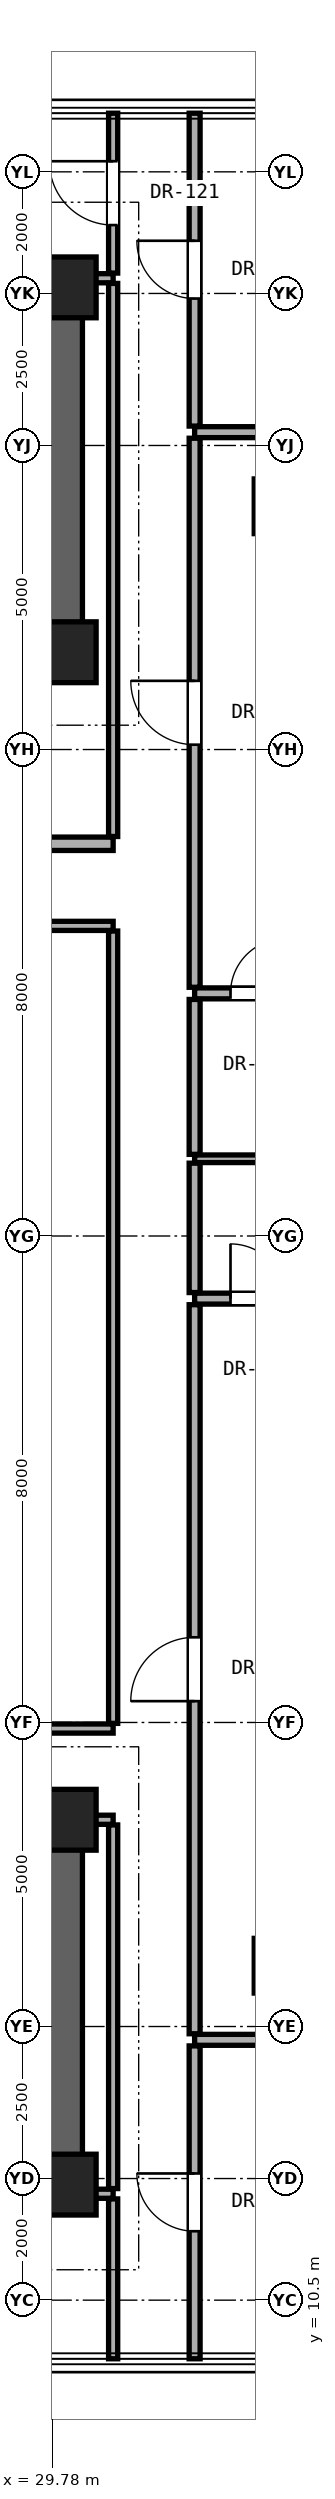
"""IFC4 building model, lengths in metres.
Left out: names, types, materials, properties, quantities, classifications, styles, units other than length and angle.
Written with IfcOpenShell. Run it as: python <this file> out.ifc"""

import sys

from ifc_helpers import new_model, si_unit, direction, frame, frame_2d, origin, origin_2d, place, context, subcontext, project, spatial, rectangle, extrude, element, fill, save


model = new_model("IFC4")
c1 = context("Model", 3, precision=1e-05, world=origin(), true_north=direction((0.0, 1.0)))
c2 = subcontext(c1, "Body", "Model", "MODEL_VIEW")
j1 = project(units=[si_unit("LENGTHUNIT", "METRE"), si_unit("PLANEANGLEUNIT", "RADIAN")], contexts=[c1])
p1 = place(None, origin())
s1 = spatial("IfcSite", under=j1, at=p1, CompositionType="ELEMENT")
p2 = place(p1, origin())
s2 = spatial("IfcBuilding", under=s1, at=p2, CompositionType="ELEMENT")
p3 = place(p2, frame((0.0, 0.0, 164.15)))
s3 = spatial("IfcBuildingStorey", under=s2, at=p3, CompositionType="ELEMENT", Elevation=164.15)
for number, where, z_axis, x_axis in (
    (1, (30.0, 12.4, 0.0), (0.0, 0.0, 1.0), (1.0, 0.0, 0.0)),
    (2, (30.0, 18.4, 0.0), (0.0, 0.0, 1.0), (1.0, 0.0, 0.0)),
    (3, (30.0, 37.6, 0.0), (0.0, 0.0, 1.0), (1.0, 0.0, 0.0)),
    (4, (30.0, 43.6, 0.0), (0.0, 0.0, 1.0), (1.0, 0.0, 0.0)),
):
    element("IfcColumn", number, at=place(p3, frame(where, z_axis=z_axis, x_axis=x_axis)), inside=s3, PredefinedType="COLUMN", context=c2, shape_type="SweptSolid", body=[
        extrude(rectangle(XDim=1.0, YDim=1.0, at=origin_2d()), origin(), (0.0, 0.0, 1.0), 3.25),
    ])
for number, where, z_axis, x_axis in (
    (5, (33.4, 16.0, 0.0), (0.0, 0.0, 1.0), (1.0, 0.0, 0.0)),
    (6, (33.4, 40.0, 0.0), (0.0, 0.0, 1.0), (1.0, 0.0, 0.0)),
):
    element("IfcColumn", number, at=place(p3, frame(where, z_axis=z_axis, x_axis=x_axis)), inside=s3, PredefinedType="PILASTER", context=c2, shape_type="SweptSolid", body=[
        extrude(rectangle(XDim=0.6, YDim=0.9, at=origin_2d()), origin(), (0.0, 0.0, 1.0), 3.25),
    ])
p4 = place(p3, frame((11.0, 43.6, 0.0), z_axis=(0.0, 0.0, 1.0), x_axis=(1.0, 0.0, 0.0)))
e7 = element("IfcWall", 7, at=p4, inside=s3, PredefinedType="SHEAR", context=c2, shape_type="SweptSolid", body=[
    extrude(rectangle(XDim=19.0, YDim=0.55, at=frame_2d((9.5, 0.0))), origin(), (0.0, 0.0, 1.0), 3.05),
])
p5 = place(p3, frame((30.0, 37.6, 0.0), z_axis=(0.0, 0.0, 1.0), x_axis=(0.0, 1.0, 0.0)))
e8 = element("IfcWall", 8, at=p5, inside=s3, PredefinedType="SHEAR", context=c2, shape_type="SweptSolid", body=[
    extrude(rectangle(XDim=6.0, YDim=0.55, at=frame_2d((3.0, 0.0))), origin(), (0.0, 0.0, 1.0), 3.05),
])
p6 = place(p3, frame((11.0, 37.6, 0.0), z_axis=(0.0, 0.0, 1.0), x_axis=(1.0, 0.0, 0.0)))
e9 = element("IfcWall", 9, at=p6, inside=s3, PredefinedType="SHEAR", context=c2, shape_type="SweptSolid", body=[
    extrude(rectangle(XDim=19.0, YDim=0.55, at=frame_2d((9.5, 0.0))), origin(), (0.0, 0.0, 1.0), 3.05),
])
p7 = place(p6, frame((1.06, 0.0, 0.0)))
e10 = element("IfcOpeningElement", 10, at=p7, cuts=e9, PredefinedType="OPENING", context=c2, shape_type="SweptSolid", body=[
    extrude(rectangle(XDim=1.15, YDim=2.2, at=frame_2d((0.575, 1.1))), frame((0.0, 0.285, 0.0), z_axis=(0.0, -1.0, 0.0), x_axis=(1.0, 0.0, 0.0)), (0.0, 0.0, 1.0), 0.57),
])
p8 = place(p6, frame((9.55, 0.0, 0.0)))
e11 = element("IfcOpeningElement", 11, at=p8, cuts=e9, PredefinedType="OPENING", context=c2, shape_type="SweptSolid", body=[
    extrude(rectangle(XDim=1.4, YDim=2.35, at=frame_2d((0.7, 1.175))), frame((0.0, 0.285, 0.0), z_axis=(0.0, -1.0, 0.0), x_axis=(1.0, 0.0, 0.0)), (0.0, 0.0, 1.0), 0.57),
])
p9 = place(p6, frame((11.95, 0.0, 0.0)))
e12 = element("IfcOpeningElement", 12, at=p9, cuts=e9, PredefinedType="OPENING", context=c2, shape_type="SweptSolid", body=[
    extrude(rectangle(XDim=1.4, YDim=2.35, at=frame_2d((0.7, 1.175))), frame((0.0, 0.285, 0.0), z_axis=(0.0, -1.0, 0.0), x_axis=(1.0, 0.0, 0.0)), (0.0, 0.0, 1.0), 0.57),
])
p10 = place(p3, frame((11.0, 12.4, 0.0), z_axis=(0.0, 0.0, 1.0), x_axis=(1.0, 0.0, 0.0)))
e13 = element("IfcWall", 13, at=p10, inside=s3, PredefinedType="SHEAR", context=c2, shape_type="SweptSolid", body=[
    extrude(rectangle(XDim=19.0, YDim=0.55, at=frame_2d((9.5, 0.0))), origin(), (0.0, 0.0, 1.0), 3.05),
])
p11 = place(p3, frame((30.0, 12.4, 0.0), z_axis=(0.0, 0.0, 1.0), x_axis=(0.0, 1.0, 0.0)))
e14 = element("IfcWall", 14, at=p11, inside=s3, PredefinedType="SHEAR", context=c2, shape_type="SweptSolid", body=[
    extrude(rectangle(XDim=6.0, YDim=0.55, at=frame_2d((3.0, 0.0))), origin(), (0.0, 0.0, 1.0), 3.05),
])
p12 = place(p3, frame((11.0, 18.4, 0.0), z_axis=(0.0, 0.0, 1.0), x_axis=(1.0, 0.0, 0.0)))
e15 = element("IfcWall", 15, at=p12, inside=s3, PredefinedType="SHEAR", context=c2, shape_type="SweptSolid", body=[
    extrude(rectangle(XDim=19.0, YDim=0.55, at=frame_2d((9.5, 0.0))), origin(), (0.0, 0.0, 1.0), 3.05),
])
p13 = place(p12, frame((4.175, 0.0, 0.0)))
e16 = element("IfcOpeningElement", 16, at=p13, cuts=e15, PredefinedType="OPENING", context=c2, shape_type="SweptSolid", body=[
    extrude(rectangle(XDim=1.2, YDim=2.25, at=frame_2d((0.6, 1.125))), frame((0.0, 0.285, 0.0), z_axis=(0.0, -1.0, 0.0), x_axis=(1.0, 0.0, 0.0)), (0.0, 0.0, 1.0), 0.57),
])
p14 = place(p12, frame((14.3, 0.0, 0.0)))
e17 = element("IfcOpeningElement", 17, at=p14, cuts=e15, PredefinedType="OPENING", context=c2, shape_type="SweptSolid", body=[
    extrude(rectangle(XDim=1.3, YDim=2.3, at=frame_2d((0.65, 1.15))), frame((0.0, 0.285, 0.0), z_axis=(0.0, -1.0, 0.0), x_axis=(1.0, 0.0, 0.0)), (0.0, 0.0, 1.0), 0.57),
])
p15 = place(p12, frame((16.6, 0.0, 0.0)))
e18 = element("IfcOpeningElement", 18, at=p15, cuts=e15, PredefinedType="OPENING", context=c2, shape_type="SweptSolid", body=[
    extrude(rectangle(XDim=1.3, YDim=2.3, at=frame_2d((0.65, 1.15))), frame((0.0, 0.285, 0.0), z_axis=(0.0, -1.0, 0.0), x_axis=(1.0, 0.0, 0.0)), (0.0, 0.0, 1.0), 0.57),
])
p16 = place(p3, frame((30.27, 12.25, 0.0), z_axis=(0.0, 0.0, 1.0), x_axis=(1.0, 0.0, 0.0)))
e19 = element("IfcWall", 19, at=p16, inside=s3, PredefinedType="PARTITIONING", context=c2, shape_type="SweptSolid", body=[
    extrude(rectangle(XDim=0.51, YDim=0.15, at=frame_2d((0.255, 0.0))), origin(), (0.0, 0.0, 1.0), 3.05),
])
p17 = place(p3, frame((32.12, 14.781, 0.0), z_axis=(0.0, 0.0, 1.0), x_axis=(1.0, 0.0, 0.0)))
e20 = element("IfcWall", 20, at=p17, inside=s3, PredefinedType="PARTITIONING", context=c2, shape_type="SweptSolid", body=[
    extrude(rectangle(XDim=3.585, YDim=0.18, at=frame_2d((1.792, 0.0))), origin(), (0.0, 0.0, 1.0), 3.05),
])
p18 = place(p3, frame((30.27, 18.4, 0.0), z_axis=(0.0, 0.0, 1.0), x_axis=(1.0, 0.0, 0.0)))
e21 = element("IfcWall", 21, at=p18, inside=s3, PredefinedType="PARTITIONING", context=c2, shape_type="SweptSolid", body=[
    extrude(rectangle(XDim=0.51, YDim=0.15, at=frame_2d((0.255, 0.0))), origin(), (0.0, 0.0, 1.0), 2.442),
])
p19 = place(p3, frame((10.22, 19.9, 0.0), z_axis=(0.0, 0.0, 1.0), x_axis=(1.0, 0.0, 0.0)))
e22 = element("IfcWall", 22, at=p19, inside=s3, PredefinedType="PARTITIONING", context=c2, shape_type="SweptSolid", body=[
    extrude(rectangle(XDim=20.56, YDim=0.15, at=frame_2d((10.28, 0.0))), origin(), (0.0, 0.0, 1.0), 2.186),
])
p20 = place(p19, frame((1.66, 0.0, 0.0)))
e23 = element("IfcOpeningElement", 23, at=p20, cuts=e22, PredefinedType="OPENING", context=c2, shape_type="SweptSolid", body=[
    extrude(rectangle(XDim=0.9, YDim=2.1, at=frame_2d((0.45, 1.05))), frame((0.0, 0.085, 0.0), z_axis=(0.0, -1.0, 0.0), x_axis=(1.0, 0.0, 0.0)), (0.0, 0.0, 1.0), 0.17),
])
p21 = place(p19, frame((3.87, 0.0, 0.0)))
e24 = element("IfcOpeningElement", 24, at=p21, cuts=e22, PredefinedType="OPENING", context=c2, shape_type="SweptSolid", body=[
    extrude(rectangle(XDim=0.95, YDim=2.15, at=frame_2d((0.475, 1.075))), frame((0.0, 0.085, 0.0), z_axis=(0.0, -1.0, 0.0), x_axis=(1.0, 0.0, 0.0)), (0.0, 0.0, 1.0), 0.17),
])
p22 = place(p19, frame((7.661, 0.0, 0.0)))
e25 = element("IfcOpeningElement", 25, at=p22, cuts=e22, PredefinedType="OPENING", context=c2, shape_type="SweptSolid", body=[
    extrude(rectangle(XDim=0.85, YDim=2.01, at=frame_2d((0.425, 1.005))), frame((0.0, 0.085, 0.0), z_axis=(0.0, -1.0, 0.0), x_axis=(1.0, 0.0, 0.0)), (0.0, 0.0, 1.0), 0.17),
])
p23 = place(p3, frame((32.12, 26.97, 0.0), z_axis=(0.0, 0.0, 1.0), x_axis=(1.0, 0.0, 0.0)))
e26 = element("IfcWall", 26, at=p23, inside=s3, PredefinedType="PARTITIONING", context=c2, shape_type="SweptSolid", body=[
    extrude(rectangle(XDim=8.85, YDim=0.18, at=frame_2d((4.425, 0.0))), origin(), (0.0, 0.0, 1.0), 2.269),
])
p24 = place(p23, frame((4.95, 0.0, 0.0)))
e27 = element("IfcOpeningElement", 27, at=p24, cuts=e26, PredefinedType="OPENING", context=c2, shape_type="SweptSolid", body=[
    extrude(rectangle(XDim=0.95, YDim=2.15, at=frame_2d((0.475, 1.075))), frame((0.0, 0.1, 0.0), z_axis=(0.0, -1.0, 0.0), x_axis=(1.0, 0.0, 0.0)), (0.0, 0.0, 1.0), 0.2),
])
p25 = place(p23, frame((0.59, 0.0, 0.0)))
e28 = element("IfcOpeningElement", 28, at=p25, cuts=e26, PredefinedType="OPENING", context=c2, shape_type="SweptSolid", body=[
    extrude(rectangle(XDim=0.9, YDim=2.1, at=frame_2d((0.45, 1.05))), frame((0.0, 0.1, 0.0), z_axis=(0.0, -1.0, 0.0), x_axis=(1.0, 0.0, 0.0)), (0.0, 0.0, 1.0), 0.2),
])
p26 = place(p3, frame((32.12, 29.27, 0.0), z_axis=(0.0, 0.0, 1.0), x_axis=(1.0, 0.0, 0.0)))
e29 = element("IfcWall", 29, at=p26, inside=s3, PredefinedType="PARTITIONING", context=c2, shape_type="SweptSolid", body=[
    extrude(rectangle(XDim=8.85, YDim=0.125, at=frame_2d((4.425, 0.0))), origin(), (0.0, 0.0, 1.0), 2.269),
])
p27 = place(p3, frame((32.12, 31.99, 0.0), z_axis=(0.0, 0.0, 1.0), x_axis=(1.0, 0.0, 0.0)))
e30 = element("IfcWall", 30, at=p27, inside=s3, PredefinedType="PARTITIONING", context=c2, shape_type="SweptSolid", body=[
    extrude(rectangle(XDim=8.85, YDim=0.18, at=frame_2d((4.425, 0.0))), origin(), (0.0, 0.0, 1.0), 2.269),
])
p28 = place(p27, frame((4.95, 0.0, 0.0)))
e31 = element("IfcOpeningElement", 31, at=p28, cuts=e30, PredefinedType="OPENING", context=c2, shape_type="SweptSolid", body=[
    extrude(rectangle(XDim=0.95, YDim=2.15, at=frame_2d((0.475, 1.075))), frame((0.0, 0.1, 0.0), z_axis=(0.0, -1.0, 0.0), x_axis=(1.0, 0.0, 0.0)), (0.0, 0.0, 1.0), 0.2),
])
p29 = place(p27, frame((0.59, 0.0, 0.0)))
e32 = element("IfcOpeningElement", 32, at=p29, cuts=e30, PredefinedType="OPENING", context=c2, shape_type="SweptSolid", body=[
    extrude(rectangle(XDim=0.9, YDim=2.1, at=frame_2d((0.45, 1.05))), frame((0.0, 0.1, 0.0), z_axis=(0.0, -1.0, 0.0), x_axis=(1.0, 0.0, 0.0)), (0.0, 0.0, 1.0), 0.2),
])
p30 = place(p3, frame((10.22, 33.1, 0.0), z_axis=(0.0, 0.0, 1.0), x_axis=(1.0, 0.0, 0.0)))
e33 = element("IfcWall", 33, at=p30, inside=s3, PredefinedType="PARTITIONING", context=c2, shape_type="SweptSolid", body=[
    extrude(rectangle(XDim=20.56, YDim=0.15, at=frame_2d((10.28, 0.0))), origin(), (0.0, 0.0, 1.0), 2.186),
])
p31 = place(p30, frame((12.636, 0.0, 0.0)))
e34 = element("IfcOpeningElement", 34, at=p31, cuts=e33, PredefinedType="OPENING", context=c2, shape_type="SweptSolid", body=[
    extrude(rectangle(XDim=0.85, YDim=2.01, at=frame_2d((0.425, 1.005))), frame((0.0, 0.085, 0.0), z_axis=(0.0, -1.0, 0.0), x_axis=(1.0, 0.0, 0.0)), (0.0, 0.0, 1.0), 0.17),
])
p32 = place(p30, frame((17.665, 0.0, 0.0)))
e35 = element("IfcOpeningElement", 35, at=p32, cuts=e33, PredefinedType="OPENING", context=c2, shape_type="SweptSolid", body=[
    extrude(rectangle(XDim=0.85, YDim=2.01, at=frame_2d((0.425, 1.005))), frame((0.0, 0.085, 0.0), z_axis=(0.0, -1.0, 0.0), x_axis=(1.0, 0.0, 0.0)), (0.0, 0.0, 1.0), 0.17),
])
p33 = place(p3, frame((15.59, 34.45, 0.0), z_axis=(0.0, 0.0, 1.0), x_axis=(1.0, 0.0, 0.0)))
e36 = element("IfcWall", 36, at=p33, inside=s3, PredefinedType="SOLIDWALL", context=c2, shape_type="SweptSolid", body=[
    extrude(rectangle(XDim=15.19, YDim=0.22, at=frame_2d((7.595, 0.0))), origin(), (0.0, 0.0, 1.0), 2.186),
])
p34 = place(p33, frame((6.435, 0.0, 0.0)))
e37 = element("IfcOpeningElement", 37, at=p34, cuts=e36, PredefinedType="OPENING", context=c2, shape_type="SweptSolid", body=[
    extrude(rectangle(XDim=0.85, YDim=2.01, at=frame_2d((0.425, 1.005))), frame((0.0, 0.12, 0.0), z_axis=(0.0, -1.0, 0.0), x_axis=(1.0, 0.0, 0.0)), (0.0, 0.0, 1.0), 0.24),
])
p35 = place(p33, frame((9.96, 0.0, 0.0)))
e38 = element("IfcOpeningElement", 38, at=p35, cuts=e36, PredefinedType="OPENING", context=c2, shape_type="SweptSolid", body=[
    extrude(rectangle(XDim=0.95, YDim=2.15, at=frame_2d((0.475, 1.075))), frame((0.0, 0.12, 0.0), z_axis=(0.0, -1.0, 0.0), x_axis=(1.0, 0.0, 0.0)), (0.0, 0.0, 1.0), 0.24),
])
p36 = place(p33, frame((12.21, 0.0, 0.0)))
e39 = element("IfcOpeningElement", 39, at=p36, cuts=e36, PredefinedType="OPENING", context=c2, shape_type="SweptSolid", body=[
    extrude(rectangle(XDim=0.95, YDim=2.15, at=frame_2d((0.475, 1.075))), frame((0.0, 0.12, 0.0), z_axis=(0.0, -1.0, 0.0), x_axis=(1.0, 0.0, 0.0)), (0.0, 0.0, 1.0), 0.24),
])
p37 = place(p33, frame((0.675, 0.0, 0.0)))
e40 = element("IfcOpeningElement", 40, at=p37, cuts=e36, PredefinedType="OPENING", context=c2, shape_type="SweptSolid", body=[
    extrude(rectangle(XDim=0.85, YDim=2.01, at=frame_2d((0.425, 1.005))), frame((0.0, 0.12, 0.0), z_axis=(0.0, -1.0, 0.0), x_axis=(1.0, 0.0, 0.0)), (0.0, 0.0, 1.0), 0.24),
])
p38 = place(p33, frame((2.835, 0.0, 0.0)))
e41 = element("IfcOpeningElement", 41, at=p38, cuts=e36, PredefinedType="OPENING", context=c2, shape_type="SweptSolid", body=[
    extrude(rectangle(XDim=0.85, YDim=2.01, at=frame_2d((0.425, 1.005))), frame((0.0, 0.12, 0.0), z_axis=(0.0, -1.0, 0.0), x_axis=(1.0, 0.0, 0.0)), (0.0, 0.0, 1.0), 0.24),
])
p39 = place(p3, frame((32.12, 41.219, 0.0), z_axis=(0.0, 0.0, 1.0), x_axis=(1.0, 0.0, 0.0)))
e42 = element("IfcWall", 42, at=p39, inside=s3, PredefinedType="PARTITIONING", context=c2, shape_type="SweptSolid", body=[
    extrude(rectangle(XDim=3.585, YDim=0.18, at=frame_2d((1.792, 0.0))), origin(), (0.0, 0.0, 1.0), 3.05),
])
p40 = place(p3, frame((30.27, 43.75, 0.0), z_axis=(0.0, 0.0, 1.0), x_axis=(1.0, 0.0, 0.0)))
e43 = element("IfcWall", 43, at=p40, inside=s3, PredefinedType="PARTITIONING", context=c2, shape_type="SweptSolid", body=[
    extrude(rectangle(XDim=0.51, YDim=0.15, at=frame_2d((0.255, 0.0))), origin(), (0.0, 0.0, 1.0), 3.05),
])
p41 = place(p3, frame((30.78, 9.536, 0.0), z_axis=(0.0, 0.0, 1.0), x_axis=(0.0, 1.0, 0.0)))
e44 = element("IfcWall", 44, at=p41, inside=s3, PredefinedType="PARTITIONING", context=c2, shape_type="SweptSolid", body=[
    extrude(rectangle(XDim=2.629, YDim=0.15, at=frame_2d((1.314, 0.0))), origin(), (0.0, 0.0, 1.0), 3.05),
])
p42 = place(p3, frame((30.78, 12.335, 0.0), z_axis=(0.0, 0.0, 1.0), x_axis=(0.0, 1.0, 0.0)))
e45 = element("IfcWall", 45, at=p42, inside=s3, PredefinedType="PARTITIONING", context=c2, shape_type="SweptSolid", body=[
    extrude(rectangle(XDim=5.98, YDim=0.15, at=frame_2d((2.99, 0.0))), origin(), (0.0, 0.0, 1.0), 2.442),
])
p43 = place(p3, frame((30.78, 19.985, 0.0), z_axis=(0.0, 0.0, 1.0), x_axis=(0.0, 1.0, 0.0)))
e46 = element("IfcWall", 46, at=p43, inside=s3, PredefinedType="PARTITIONING", context=c2, shape_type="SweptSolid", body=[
    extrude(rectangle(XDim=13.03, YDim=0.15, at=frame_2d((6.515, 0.0))), origin(), (0.0, 0.0, 1.0), 2.346),
])
p44 = place(p3, frame((30.78, 34.57, 0.0), z_axis=(0.0, 0.0, 1.0), x_axis=(0.0, 1.0, 0.0)))
e47 = element("IfcWall", 47, at=p44, inside=s3, PredefinedType="PARTITIONING", context=c2, shape_type="SweptSolid", body=[
    extrude(rectangle(XDim=9.095, YDim=0.15, at=frame_2d((4.547, 0.0))), origin(), (0.0, 0.0, 1.0), 2.442),
])
p45 = place(p3, frame((30.78, 43.835, 0.0), z_axis=(0.0, 0.0, 1.0), x_axis=(0.0, 1.0, 0.0)))
e48 = element("IfcWall", 48, at=p45, inside=s3, PredefinedType="PARTITIONING", context=c2, shape_type="SweptSolid", body=[
    extrude(rectangle(XDim=2.629, YDim=0.15, at=frame_2d((1.314, 0.0))), origin(), (0.0, 0.0, 1.0), 3.05),
])
p46 = place(p45, frame((0.79, 0.0, 0.0)))
e49 = element("IfcOpeningElement", 49, at=p46, cuts=e48, PredefinedType="OPENING", context=c2, shape_type="SweptSolid", body=[
    extrude(rectangle(XDim=1.05, YDim=2.2, at=frame_2d((0.525, 1.1))), frame((0.0, 0.085, 0.0), z_axis=(0.0, -1.0, 0.0), x_axis=(1.0, 0.0, 0.0)), (0.0, 0.0, 1.0), 0.17),
])
p47 = place(p3, frame((32.12, 9.536, 0.0), z_axis=(0.0, 0.0, 1.0), x_axis=(0.0, 1.0, 0.0)))
e50 = element("IfcWall", 50, at=p47, inside=s3, PredefinedType="PARTITIONING", context=c2, shape_type="SweptSolid", body=[
    extrude(rectangle(XDim=5.145, YDim=0.18, at=frame_2d((2.573, 0.0))), origin(), (0.0, 0.0, 1.0), 3.05),
])
p48 = place(p47, frame((2.097, 0.0, 0.0)))
e51 = element("IfcOpeningElement", 51, at=p48, cuts=e50, PredefinedType="OPENING", context=c2, shape_type="SweptSolid", body=[
    extrude(rectangle(XDim=0.95, YDim=2.15, at=frame_2d((0.475, 1.075))), frame((0.0, 0.1, 0.0), z_axis=(0.0, -1.0, 0.0), x_axis=(1.0, 0.0, 0.0)), (0.0, 0.0, 1.0), 0.2),
])
p49 = place(p3, frame((32.12, 14.881, 0.0), z_axis=(0.0, 0.0, 1.0), x_axis=(0.0, 1.0, 0.0)))
e52 = element("IfcWall", 52, at=p49, inside=s3, PredefinedType="PARTITIONING", context=c2, shape_type="SweptSolid", body=[
    extrude(rectangle(XDim=11.989, YDim=0.18, at=frame_2d((5.995, 0.0))), origin(), (0.0, 0.0, 1.0), 2.346),
])
p50 = place(p49, frame((5.469, 0.0, 0.0)))
e53 = element("IfcOpeningElement", 53, at=p50, cuts=e52, PredefinedType="OPENING", context=c2, shape_type="SweptSolid", body=[
    extrude(rectangle(XDim=1.05, YDim=2.2, at=frame_2d((0.525, 1.1))), frame((0.0, 0.1, 0.0), z_axis=(0.0, -1.0, 0.0), x_axis=(1.0, 0.0, 0.0)), (0.0, 0.0, 1.0), 0.2),
])
p51 = place(p3, frame((32.12, 27.07, 0.0), z_axis=(0.0, 0.0, 1.0), x_axis=(0.0, 1.0, 0.0)))
e54 = element("IfcWall", 54, at=p51, inside=s3, PredefinedType="PARTITIONING", context=c2, shape_type="SweptSolid", body=[
    extrude(rectangle(XDim=2.127, YDim=0.18, at=frame_2d((1.064, 0.0))), origin(), (0.0, 0.0, 1.0), 3.05),
])
p52 = place(p3, frame((32.12, 29.343, 0.0), z_axis=(0.0, 0.0, 1.0), x_axis=(0.0, 1.0, 0.0)))
e55 = element("IfcWall", 55, at=p52, inside=s3, PredefinedType="PARTITIONING", context=c2, shape_type="SweptSolid", body=[
    extrude(rectangle(XDim=2.547, YDim=0.18, at=frame_2d((1.274, 0.0))), origin(), (0.0, 0.0, 1.0), 2.346),
])
p53 = place(p3, frame((32.12, 32.09, 0.0), z_axis=(0.0, 0.0, 1.0), x_axis=(0.0, 1.0, 0.0)))
e56 = element("IfcWall", 56, at=p53, inside=s3, PredefinedType="PARTITIONING", context=c2, shape_type="SweptSolid", body=[
    extrude(rectangle(XDim=9.029, YDim=0.18, at=frame_2d((4.514, 0.0))), origin(), (0.0, 0.0, 1.0), 2.442),
])
p54 = place(p53, frame((3.99, 0.0, 0.0)))
e57 = element("IfcOpeningElement", 57, at=p54, cuts=e56, PredefinedType="OPENING", context=c2, shape_type="SweptSolid", body=[
    extrude(rectangle(XDim=1.05, YDim=2.2, at=frame_2d((0.525, 1.1))), frame((0.0, 0.1, 0.0), z_axis=(0.0, -1.0, 0.0), x_axis=(1.0, 0.0, 0.0)), (0.0, 0.0, 1.0), 0.2),
])
p55 = place(p3, frame((32.12, 41.319, 0.0), z_axis=(0.0, 0.0, 1.0), x_axis=(0.0, 1.0, 0.0)))
e58 = element("IfcWall", 58, at=p55, inside=s3, PredefinedType="PARTITIONING", context=c2, shape_type="SweptSolid", body=[
    extrude(rectangle(XDim=5.145, YDim=0.18, at=frame_2d((2.573, 0.0))), origin(), (0.0, 0.0, 1.0), 3.05),
])
p56 = place(p55, frame((2.097, 0.0, 0.0)))
e59 = element("IfcOpeningElement", 59, at=p56, cuts=e58, PredefinedType="OPENING", context=c2, shape_type="SweptSolid", body=[
    extrude(rectangle(XDim=0.95, YDim=2.15, at=frame_2d((0.475, 1.075))), frame((0.0, 0.1, 0.0), z_axis=(0.0, -1.0, 0.0), x_axis=(1.0, 0.0, 0.0)), (0.0, 0.0, 1.0), 0.2),
])
p57 = place(p50, origin())
e60 = element("IfcDoor", 60, at=p57, inside=s3, OperationType="SINGLE_SWING_LEFT", PredefinedType="DOOR", context=c2, shape_type="SweptSolid", body=[
    extrude(rectangle(XDim=1.05, YDim=2.2, at=frame_2d((0.525, 1.1))), frame((0.0, 0.025, 0.0), z_axis=(0.0, -1.0, 0.0), x_axis=(1.0, 0.0, 0.0)), (0.0, 0.0, 1.0), 0.05),
])
fill(e53, e60)
p58 = place(p25, origin())
e61 = element("IfcDoor", 61, at=p58, inside=s3, OperationType="SINGLE_SWING_LEFT", PredefinedType="DOOR", context=c2, shape_type="SweptSolid", body=[
    extrude(rectangle(XDim=0.9, YDim=2.1, at=frame_2d((0.45, 1.05))), frame((0.0, 0.025, 0.0), z_axis=(0.0, -1.0, 0.0), x_axis=(1.0, 0.0, 0.0)), (0.0, 0.0, 1.0), 0.05),
])
fill(e28, e61)
p59 = place(p54, origin())
e62 = element("IfcDoor", 62, at=p59, inside=s3, OperationType="SINGLE_SWING_RIGHT", PredefinedType="DOOR", context=c2, shape_type="SweptSolid", body=[
    extrude(rectangle(XDim=1.05, YDim=2.2, at=frame_2d((0.525, 1.1))), frame((0.0, 0.025, 0.0), z_axis=(0.0, -1.0, 0.0), x_axis=(1.0, 0.0, 0.0)), (0.0, 0.0, 1.0), 0.05),
])
fill(e57, e62)
p60 = place(p29, origin())
e63 = element("IfcDoor", 63, at=p60, inside=s3, OperationType="SINGLE_SWING_RIGHT", PredefinedType="DOOR", context=c2, shape_type="SweptSolid", body=[
    extrude(rectangle(XDim=0.9, YDim=2.1, at=frame_2d((0.45, 1.05))), frame((0.0, 0.025, 0.0), z_axis=(0.0, -1.0, 0.0), x_axis=(1.0, 0.0, 0.0)), (0.0, 0.0, 1.0), 0.05),
])
fill(e32, e63)
p61 = place(p48, origin())
e64 = element("IfcDoor", 64, at=p61, inside=s3, OperationType="SINGLE_SWING_RIGHT", PredefinedType="DOOR", context=c2, shape_type="SweptSolid", body=[
    extrude(rectangle(XDim=0.95, YDim=2.15, at=frame_2d((0.475, 1.075))), frame((0.0, 0.025, 0.0), z_axis=(0.0, -1.0, 0.0), x_axis=(1.0, 0.0, 0.0)), (0.0, 0.0, 1.0), 0.05),
])
fill(e51, e64)
p62 = place(p46, origin())
e65 = element("IfcDoor", 65, at=p62, inside=s3, OperationType="SINGLE_SWING_RIGHT", PredefinedType="DOOR", context=c2, shape_type="SweptSolid", body=[
    extrude(rectangle(XDim=1.05, YDim=2.2, at=frame_2d((0.525, 1.1))), frame((0.0, 0.025, 0.0), z_axis=(0.0, -1.0, 0.0), x_axis=(1.0, 0.0, 0.0)), (0.0, 0.0, 1.0), 0.05),
])
fill(e49, e65)
p63 = place(p56, origin())
e66 = element("IfcDoor", 66, at=p63, inside=s3, OperationType="SINGLE_SWING_RIGHT", PredefinedType="DOOR", context=c2, shape_type="SweptSolid", body=[
    extrude(rectangle(XDim=0.95, YDim=2.15, at=frame_2d((0.475, 1.075))), frame((0.0, 0.025, 0.0), z_axis=(0.0, -1.0, 0.0), x_axis=(1.0, 0.0, 0.0)), (0.0, 0.0, 1.0), 0.05),
])
fill(e59, e66)
save(model, sys.argv[1])
